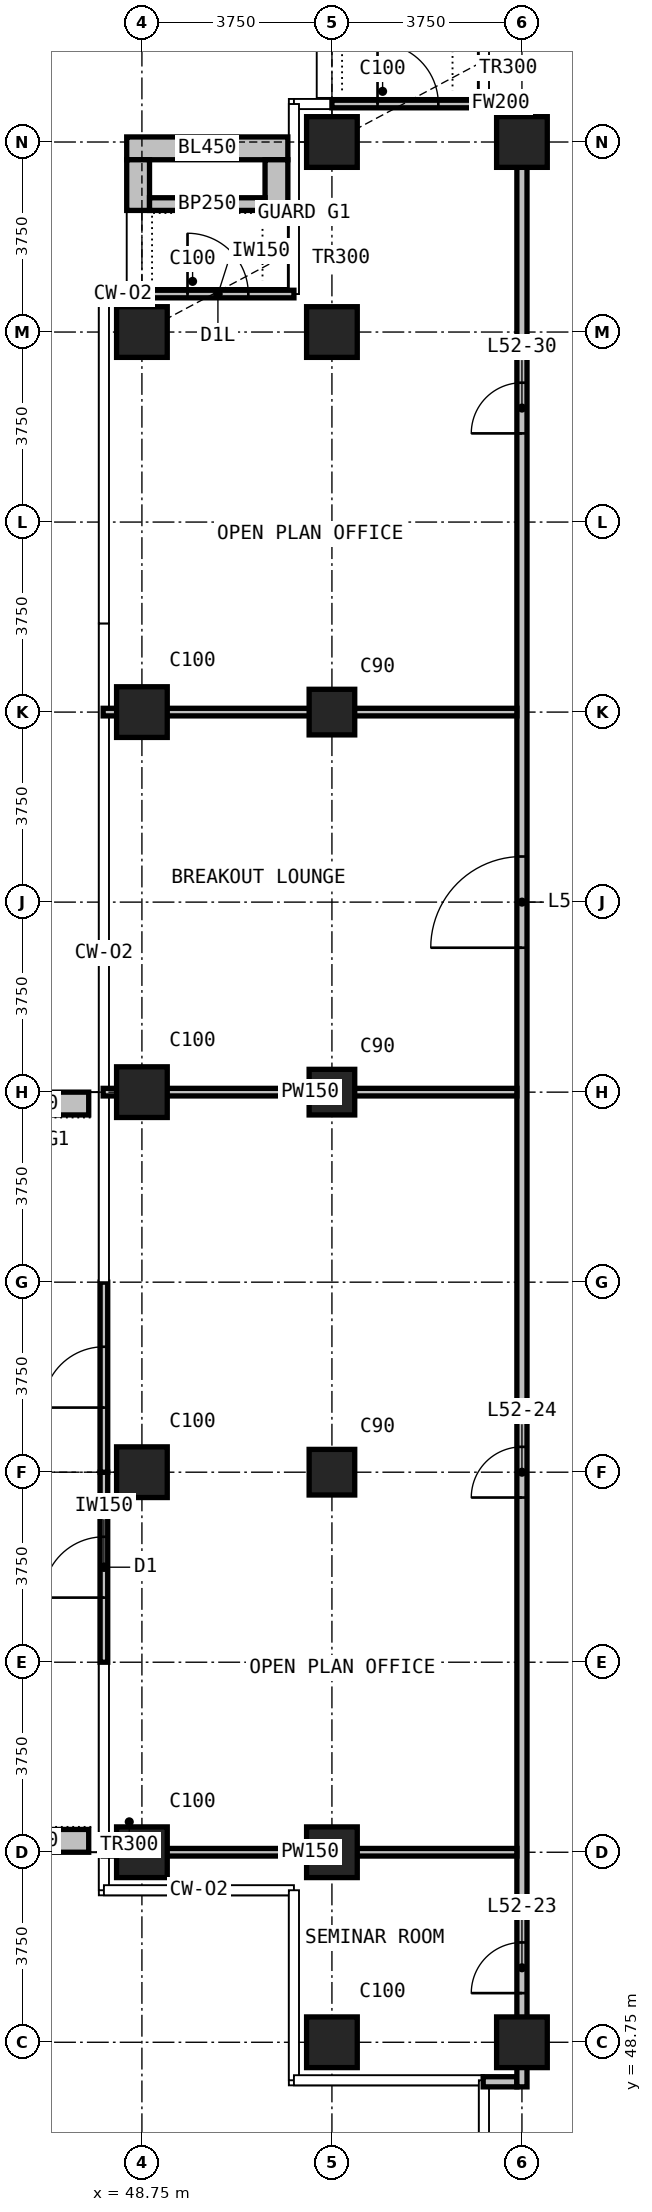
"""IFC4 building model, lengths in metres.
Left out: names, types, materials, properties, quantities, classifications, styles, units other than length and angle.
Written with IfcOpenShell. Run it as: python <this file> out.ifc"""

import sys

from ifc_helpers import new_model, si_unit, direction, frame, frame_2d, origin, origin_2d, place, context, subcontext, project, spatial, rectangle, extrude, element, fill, save


model = new_model("IFC4")
c1 = context("Model", 3, precision=1e-05, world=origin(), true_north=direction((0.0, 1.0)))
c2 = subcontext(c1, "Body", "Model", "MODEL_VIEW")
j1 = project(units=[si_unit("LENGTHUNIT", "METRE"), si_unit("PLANEANGLEUNIT", "RADIAN")], contexts=[c1])
p1 = place(None, origin())
s1 = spatial("IfcSite", under=j1, at=p1, CompositionType="ELEMENT")
p2 = place(p1, origin())
s2 = spatial("IfcBuilding", under=s1, at=p2, CompositionType="ELEMENT")
p3 = place(p2, frame((0.0, 0.0, 203.1)))
s3 = spatial("IfcBuildingStorey", under=s2, at=p3, CompositionType="ELEMENT", Elevation=203.1)
for number, where, z_axis, x_axis in (
    (1, (48.75, 52.5, 0.0), (0.0, 0.0, 1.0), (1.0, 0.0, 0.0)),
    (2, (48.75, 60.0, 0.0), (0.0, 0.0, 1.0), (1.0, 0.0, 0.0)),
    (3, (48.75, 67.5, 0.0), (0.0, 0.0, 1.0), (1.0, 0.0, 0.0)),
    (4, (48.75, 75.0, 0.0), (0.0, 0.0, 1.0), (1.0, 0.0, 0.0)),
    (5, (48.75, 82.5, 0.0), (0.0, 0.0, 1.0), (1.0, 0.0, 0.0)),
    (6, (52.5, 48.75, 0.0), (0.0, 0.0, 1.0), (1.0, 0.0, 0.0)),
    (7, (52.5, 52.5, 0.0), (0.0, 0.0, 1.0), (1.0, 0.0, 0.0)),
):
    element("IfcColumn", number, at=place(p3, frame(where, z_axis=z_axis, x_axis=x_axis)), inside=s3, PredefinedType="COLUMN", context=c2, shape_type="SweptSolid", body=[
        extrude(rectangle(XDim=1.0, YDim=1.0, at=origin_2d()), origin(), (0.0, 0.0, 1.0), 3.6),
    ])
for number, where, z_axis, x_axis in (
    (8, (52.5, 60.0, 0.0), (0.0, 0.0, 1.0), (1.0, 0.0, 0.0)),
    (9, (52.5, 67.5, 0.0), (0.0, 0.0, 1.0), (1.0, 0.0, 0.0)),
    (10, (52.5, 75.0, 0.0), (0.0, 0.0, 1.0), (1.0, 0.0, 0.0)),
):
    element("IfcColumn", number, at=place(p3, frame(where, z_axis=z_axis, x_axis=x_axis)), inside=s3, PredefinedType="COLUMN", context=c2, shape_type="SweptSolid", body=[
        extrude(rectangle(XDim=0.9, YDim=0.9, at=origin_2d()), origin(), (0.0, 0.0, 1.0), 3.6),
    ])
for number, where, z_axis, x_axis in (
    (11, (52.5, 82.5, 0.0), (0.0, 0.0, 1.0), (1.0, 0.0, 0.0)),
    (12, (52.5, 86.25, 0.0), (0.0, 0.0, 1.0), (1.0, 0.0, 0.0)),
    (13, (56.25, 48.75, 0.0), (0.0, 0.0, 1.0), (1.0, 0.0, 0.0)),
    (14, (56.25, 86.25, 0.0), (0.0, 0.0, 1.0), (1.0, 0.0, 0.0)),
):
    element("IfcColumn", number, at=place(p3, frame(where, z_axis=z_axis, x_axis=x_axis)), inside=s3, PredefinedType="COLUMN", context=c2, shape_type="SweptSolid", body=[
        extrude(rectangle(XDim=1.0, YDim=1.0, at=origin_2d()), origin(), (0.0, 0.0, 1.0), 3.6),
    ])
p4 = place(p3, frame((52.5, 87.0, 0.0), z_axis=(0.0, 0.0, 1.0), x_axis=(1.0, 0.0, 0.0)))
e15 = element("IfcWall", 15, at=p4, inside=s3, PredefinedType="SOLIDWALL", context=c2, shape_type="SweptSolid", body=[
    extrude(rectangle(XDim=3.0, YDim=0.15, at=frame_2d((1.5, 0.0))), origin(), (0.0, 0.0, 1.0), 3.3),
])
p5 = place(p4, frame((0.9, 0.0, 0.0)))
e16 = element("IfcOpeningElement", 16, at=p5, cuts=e15, PredefinedType="OPENING", context=c2, shape_type="SweptSolid", body=[
    extrude(rectangle(XDim=1.2, YDim=2.0, at=frame_2d((0.6, 1.0))), frame((0.0, 0.085, 0.0), z_axis=(0.0, -1.0, 0.0), x_axis=(1.0, 0.0, 0.0)), (0.0, 0.0, 1.0), 0.17),
])
p6 = place(p3, frame((48.75, 83.25, 0.0), z_axis=(0.0, 0.0, 1.0), x_axis=(1.0, 0.0, 0.0)))
e17 = element("IfcWall", 17, at=p6, inside=s3, PredefinedType="SOLIDWALL", context=c2, shape_type="SweptSolid", body=[
    extrude(rectangle(XDim=3.0, YDim=0.15, at=frame_2d((1.5, 0.0))), origin(), (0.0, 0.0, 1.0), 3.3),
])
p7 = place(p6, frame((0.9, 0.0, 0.0)))
e18 = element("IfcOpeningElement", 18, at=p7, cuts=e17, PredefinedType="OPENING", context=c2, shape_type="SweptSolid", body=[
    extrude(rectangle(XDim=1.2, YDim=2.0, at=frame_2d((0.6, 1.0))), frame((0.0, 0.085, 0.0), z_axis=(0.0, -1.0, 0.0), x_axis=(1.0, 0.0, 0.0)), (0.0, 0.0, 1.0), 0.17),
])
p8 = place(p3, frame((48.0, 56.25, 0.0), z_axis=(0.0, 0.0, 1.0), x_axis=(0.0, 1.0, 0.0)))
e19 = element("IfcWall", 19, at=p8, inside=s3, PredefinedType="SOLIDWALL", context=c2, shape_type="SweptSolid", body=[
    extrude(rectangle(XDim=3.75, YDim=0.15, at=frame_2d((1.875, 0.0))), origin(), (0.0, 0.0, 1.0), 3.3),
])
p9 = place(p8, frame((1.275, 0.0, 0.0)))
e20 = element("IfcOpeningElement", 20, at=p9, cuts=e19, PredefinedType="OPENING", context=c2, shape_type="SweptSolid", body=[
    extrude(rectangle(XDim=1.2, YDim=2.4, at=frame_2d((0.6, 1.2))), frame((0.0, 0.085, 0.0), z_axis=(0.0, -1.0, 0.0), x_axis=(1.0, 0.0, 0.0)), (0.0, 0.0, 1.0), 0.17),
])
p10 = place(p3, frame((48.0, 60.0, 0.0), z_axis=(0.0, 0.0, 1.0), x_axis=(0.0, 1.0, 0.0)))
e21 = element("IfcWall", 21, at=p10, inside=s3, PredefinedType="SOLIDWALL", context=c2, shape_type="SweptSolid", body=[
    extrude(rectangle(XDim=3.75, YDim=0.15, at=frame_2d((1.875, 0.0))), origin(), (0.0, 0.0, 1.0), 3.3),
])
p11 = place(p10, frame((1.275, 0.0, 0.0)))
e22 = element("IfcOpeningElement", 22, at=p11, cuts=e21, PredefinedType="OPENING", context=c2, shape_type="SweptSolid", body=[
    extrude(rectangle(XDim=1.2, YDim=2.4, at=frame_2d((0.6, 1.2))), frame((0.0, 0.085, 0.0), z_axis=(0.0, -1.0, 0.0), x_axis=(1.0, 0.0, 0.0)), (0.0, 0.0, 1.0), 0.17),
])
p12 = place(p3, frame((48.45, 86.125, 0.0), z_axis=(0.0, 0.0, 1.0), x_axis=(1.0, 0.0, 0.0)))
e23 = element("IfcWall", 23, at=p12, inside=s3, PredefinedType="USERDEFINED", context=c2, shape_type="SweptSolid", body=[
    extrude(rectangle(XDim=3.18, YDim=0.45, at=frame_2d((1.59, 0.0))), origin(), (0.0, 0.0, 1.0), 1.1),
])
for number, where, z_axis, x_axis in (
    (24, (48.675, 84.9, 0.0), (0.0, 0.0, 1.0), (0.0, 1.0, 0.0)),
    (25, (51.405, 84.9, 0.0), (0.0, 0.0, 1.0), (0.0, 1.0, 0.0)),
):
    element("IfcWall", number, at=place(p3, frame(where, z_axis=z_axis, x_axis=x_axis)), inside=s3, PredefinedType="USERDEFINED", context=c2, shape_type="SweptSolid", body=[
        extrude(rectangle(XDim=1.0, YDim=0.45, at=frame_2d((0.5, 0.0))), origin(), (0.0, 0.0, 1.0), 1.1),
    ])
p13 = place(p3, frame((48.9, 85.025, 0.0), z_axis=(0.0, 0.0, 1.0), x_axis=(1.0, 0.0, 0.0)))
e26 = element("IfcWall", 26, at=p13, inside=s3, PredefinedType="USERDEFINED", context=c2, shape_type="SweptSolid", body=[
    extrude(rectangle(XDim=2.28, YDim=0.25, at=frame_2d((1.14, 0.0))), origin(), (0.0, 0.0, 1.0), 1.0),
])
for number, where, z_axis, x_axis in (
    (27, (47.7, 52.725, 0.0), (0.0, 0.0, 1.0), (-1.0, 0.0, 0.0)),
    (28, (47.7, 67.275, 0.0), (0.0, 0.0, 1.0), (-1.0, 0.0, 0.0)),
):
    element("IfcWall", number, at=place(p3, frame(where, z_axis=z_axis, x_axis=x_axis)), inside=s3, PredefinedType="USERDEFINED", context=c2, shape_type="SweptSolid", body=[
        extrude(rectangle(XDim=2.35, YDim=0.45, at=frame_2d((1.175, 0.0))), origin(), (0.0, 0.0, 1.0), 1.1),
    ])
p14 = place(p3, frame((55.485, 47.97, 0.0), z_axis=(0.0, 0.0, 1.0), x_axis=(1.0, 0.0, 0.0)))
e29 = element("IfcWall", 29, at=p14, inside=s3, PredefinedType="PARTITIONING", context=c2, shape_type="SweptSolid", body=[
    extrude(rectangle(XDim=0.665, YDim=0.2, at=frame_2d((0.333, 0.0))), origin(), (0.0, 0.0, 1.0), 3.3),
])
p15 = place(p3, frame((55.51, 87.03, 0.0), z_axis=(0.0, 0.0, 1.0), x_axis=(1.0, 0.0, 0.0)))
e30 = element("IfcWall", 30, at=p15, inside=s3, PredefinedType="PARTITIONING", context=c2, shape_type="SweptSolid", body=[
    extrude(rectangle(XDim=0.64, YDim=0.2, at=frame_2d((0.32, 0.0))), origin(), (0.0, 0.0, 1.0), 3.3),
])
p16 = place(p3, frame((56.25, 47.87, 0.0), z_axis=(0.0, 0.0, 1.0), x_axis=(0.0, 1.0, 0.0)))
e31 = element("IfcWall", 31, at=p16, inside=s3, PredefinedType="PARTITIONING", context=c2, shape_type="SweptSolid", body=[
    extrude(rectangle(XDim=39.26, YDim=0.2, at=frame_2d((19.63, 0.0))), origin(), (0.0, 0.0, 1.0), 3.3),
])
p17 = place(p16, frame((1.85, 0.0, 0.0)))
e32 = element("IfcOpeningElement", 32, at=p17, cuts=e31, PredefinedType="OPENING", context=c2, shape_type="SweptSolid", body=[
    extrude(rectangle(XDim=1.0, YDim=2.2, at=frame_2d((0.5, 1.1))), frame((0.0, 0.11, 0.0), z_axis=(0.0, -1.0, 0.0), x_axis=(1.0, 0.0, 0.0)), (0.0, 0.0, 1.0), 0.22),
])
p18 = place(p16, frame((11.63, 0.0, 0.0)))
e33 = element("IfcOpeningElement", 33, at=p18, cuts=e31, PredefinedType="OPENING", context=c2, shape_type="SweptSolid", body=[
    extrude(rectangle(XDim=1.0, YDim=2.2, at=frame_2d((0.5, 1.1))), frame((0.0, 0.11, 0.0), z_axis=(0.0, -1.0, 0.0), x_axis=(1.0, 0.0, 0.0)), (0.0, 0.0, 1.0), 0.22),
])
p19 = place(p16, frame((22.48, 0.0, 0.0)))
e34 = element("IfcOpeningElement", 34, at=p19, cuts=e31, PredefinedType="OPENING", context=c2, shape_type="SweptSolid", body=[
    extrude(rectangle(XDim=1.8, YDim=2.2, at=frame_2d((0.9, 1.1))), frame((0.0, 0.11, 0.0), z_axis=(0.0, -1.0, 0.0), x_axis=(1.0, 0.0, 0.0)), (0.0, 0.0, 1.0), 0.22),
])
p20 = place(p16, frame((32.63, 0.0, 0.0)))
e35 = element("IfcOpeningElement", 35, at=p20, cuts=e31, PredefinedType="OPENING", context=c2, shape_type="SweptSolid", body=[
    extrude(rectangle(XDim=1.0, YDim=2.2, at=frame_2d((0.5, 1.1))), frame((0.0, 0.11, 0.0), z_axis=(0.0, -1.0, 0.0), x_axis=(1.0, 0.0, 0.0)), (0.0, 0.0, 1.0), 0.22),
])
for number, where, z_axis, x_axis in (
    (36, (47.985, 52.5, 0.0), (0.0, 0.0, 1.0), (1.0, 0.0, 0.0)),
    (37, (47.985, 67.5, 0.0), (0.0, 0.0, 1.0), (1.0, 0.0, 0.0)),
    (38, (47.985, 75.0, 0.0), (0.0, 0.0, 1.0), (1.0, 0.0, 0.0)),
):
    element("IfcWall", number, at=place(p3, frame(where, z_axis=z_axis, x_axis=x_axis)), inside=s3, PredefinedType="PARTITIONING", context=c2, shape_type="SweptSolid", body=[
        extrude(rectangle(XDim=8.165, YDim=0.15, at=frame_2d((4.083, 0.0))), origin(), (0.0, 0.0, 1.0), 3.3),
    ])
p21 = place(p5, origin())
e39 = element("IfcDoor", 39, at=p21, inside=s3, OperationType="SINGLE_SWING_LEFT", PredefinedType="DOOR", context=c2, shape_type="SweptSolid", body=[
    extrude(rectangle(XDim=1.2, YDim=2.0, at=frame_2d((0.6, 1.0))), frame((0.0, 0.025, 0.0), z_axis=(0.0, -1.0, 0.0), x_axis=(1.0, 0.0, 0.0)), (0.0, 0.0, 1.0), 0.05),
])
fill(e16, e39)
p22 = place(p7, origin())
e40 = element("IfcDoor", 40, at=p22, inside=s3, OperationType="SINGLE_SWING_LEFT", PredefinedType="DOOR", context=c2, shape_type="SweptSolid", body=[
    extrude(rectangle(XDim=1.2, YDim=2.0, at=frame_2d((0.6, 1.0))), frame((0.0, 0.025, 0.0), z_axis=(0.0, -1.0, 0.0), x_axis=(1.0, 0.0, 0.0)), (0.0, 0.0, 1.0), 0.05),
])
fill(e18, e40)
p23 = place(p9, origin())
e41 = element("IfcDoor", 41, at=p23, inside=s3, OperationType="SINGLE_SWING_LEFT", PredefinedType="DOOR", context=c2, shape_type="SweptSolid", body=[
    extrude(rectangle(XDim=1.2, YDim=2.4, at=frame_2d((0.6, 1.2))), frame((0.0, 0.025, 0.0), z_axis=(0.0, -1.0, 0.0), x_axis=(1.0, 0.0, 0.0)), (0.0, 0.0, 1.0), 0.05),
])
fill(e20, e41)
p24 = place(p11, origin())
e42 = element("IfcDoor", 42, at=p24, inside=s3, OperationType="SINGLE_SWING_LEFT", PredefinedType="DOOR", context=c2, shape_type="SweptSolid", body=[
    extrude(rectangle(XDim=1.2, YDim=2.4, at=frame_2d((0.6, 1.2))), frame((0.0, 0.025, 0.0), z_axis=(0.0, -1.0, 0.0), x_axis=(1.0, 0.0, 0.0)), (0.0, 0.0, 1.0), 0.05),
])
fill(e22, e42)
p25 = place(p17, origin())
e43 = element("IfcDoor", 43, at=p25, inside=s3, OperationType="SINGLE_SWING_RIGHT", PredefinedType="DOOR", context=c2, shape_type="SweptSolid", body=[
    extrude(rectangle(XDim=1.0, YDim=2.2, at=frame_2d((0.5, 1.1))), frame((0.0, 0.025, 0.0), z_axis=(0.0, -1.0, 0.0), x_axis=(1.0, 0.0, 0.0)), (0.0, 0.0, 1.0), 0.05),
])
fill(e32, e43)
p26 = place(p18, origin())
e44 = element("IfcDoor", 44, at=p26, inside=s3, OperationType="SINGLE_SWING_RIGHT", PredefinedType="DOOR", context=c2, shape_type="SweptSolid", body=[
    extrude(rectangle(XDim=1.0, YDim=2.2, at=frame_2d((0.5, 1.1))), frame((0.0, 0.025, 0.0), z_axis=(0.0, -1.0, 0.0), x_axis=(1.0, 0.0, 0.0)), (0.0, 0.0, 1.0), 0.05),
])
fill(e33, e44)
p27 = place(p19, origin())
e45 = element("IfcDoor", 45, at=p27, inside=s3, OperationType="DOUBLE_DOOR_SINGLE_SWING", PredefinedType="DOOR", context=c2, shape_type="SweptSolid", body=[
    extrude(rectangle(XDim=1.8, YDim=2.2, at=frame_2d((0.9, 1.1))), frame((0.0, 0.025, 0.0), z_axis=(0.0, -1.0, 0.0), x_axis=(1.0, 0.0, 0.0)), (0.0, 0.0, 1.0), 0.05),
])
fill(e34, e45)
p28 = place(p20, origin())
e46 = element("IfcDoor", 46, at=p28, inside=s3, OperationType="SINGLE_SWING_LEFT", PredefinedType="DOOR", context=c2, shape_type="SweptSolid", body=[
    extrude(rectangle(XDim=1.0, YDim=2.2, at=frame_2d((0.5, 1.1))), frame((0.0, 0.025, 0.0), z_axis=(0.0, -1.0, 0.0), x_axis=(1.0, 0.0, 0.0)), (0.0, 0.0, 1.0), 0.05),
])
fill(e35, e46)
save(model, sys.argv[1])
